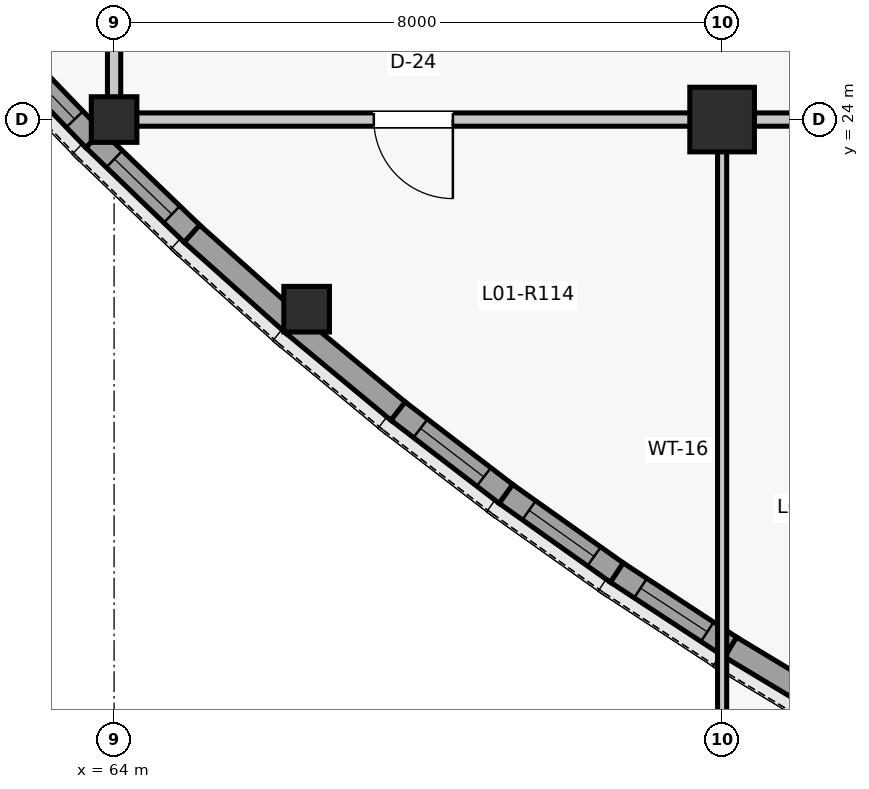
"""IFC4 building model, lengths in metres.
Left out: names, types, materials, properties, quantities, classifications, styles, units other than length and angle.
Written with IfcOpenShell. Run it as: python <this file> out.ifc"""

import sys

from ifc_helpers import new_model, si_unit, direction, frame, frame_2d, origin, origin_2d, place, context, subcontext, project, spatial, rectangle, extrude, element, fill, save


model = new_model("IFC4")
c1 = context("Model", 3, precision=1e-05, world=origin(), true_north=direction((0.0, 1.0)))
c2 = subcontext(c1, "Body", "Model", "MODEL_VIEW")
j1 = project(units=[si_unit("LENGTHUNIT", "METRE"), si_unit("PLANEANGLEUNIT", "RADIAN")], contexts=[c1])
p1 = place(None, origin())
s1 = spatial("IfcSite", under=j1, at=p1, CompositionType="ELEMENT")
p2 = place(p1, origin())
s2 = spatial("IfcBuilding", under=s1, at=p2, CompositionType="ELEMENT")
p3 = place(p2, frame((0.0, 0.0, 5.28)))
s3 = spatial("IfcBuildingStorey", under=s2, at=p3, CompositionType="ELEMENT", Elevation=5.28)
p4 = place(p3, frame((64.0, 24.0, 0.0), z_axis=(0.0, 0.0, 1.0), x_axis=(1.0, 0.0, 0.0)))
e1 = element("IfcColumn", 1, at=p4, inside=s3, PredefinedType="COLUMN", context=c2, shape_type="SweptSolid", body=[
    extrude(rectangle(XDim=0.6, YDim=0.6, at=origin_2d()), origin(), (0.0, 0.0, 1.0), 4.62),
])
p5 = place(p3, frame((72.0, 24.0, 0.0), z_axis=(0.0, 0.0, 1.0), x_axis=(1.0, 0.0, 0.0)))
e2 = element("IfcColumn", 2, at=p5, inside=s3, PredefinedType="COLUMN", context=c2, shape_type="SweptSolid", body=[
    extrude(rectangle(XDim=0.85, YDim=0.85, at=origin_2d()), origin(), (0.0, 0.0, 1.0), 4.62),
])
p6 = place(p3, frame((66.533, 21.505, 0.0), z_axis=(0.0, 0.0, 1.0), x_axis=(1.0, 0.0, 0.0)))
e3 = element("IfcColumn", 3, at=p6, inside=s3, PredefinedType="COLUMN", context=c2, shape_type="SweptSolid", body=[
    extrude(rectangle(XDim=0.6, YDim=0.6, at=origin_2d()), origin(), (0.0, 0.0, 1.0), 4.62),
])
p7 = place(p3, frame((62.494, 25.029, 0.0), z_axis=(0.0, 0.0, 1.0), x_axis=(0.693722700342, -0.720242191926, 0.0)))
e4 = element("IfcWall", 4, at=p7, inside=s3, PredefinedType="SOLIDWALL", context=c2, shape_type="SweptSolid", body=[
    extrude(rectangle(XDim=1.795, YDim=0.305, at=frame_2d((0.897, 0.0))), origin(), (0.0, 0.0, 1.0), 4.335),
])
p8 = place(p7, frame((0.373, 0.0, 0.9)))
e5 = element("IfcOpeningElement", 5, at=p8, cuts=e4, PredefinedType="OPENING", context=c2, shape_type="SweptSolid", body=[
    extrude(rectangle(XDim=1.05, YDim=1.85, at=frame_2d((0.525, 0.925))), frame((0.0, 0.162, 0.0), z_axis=(0.0, -1.0, 0.0), x_axis=(1.0, 0.0, 0.0)), (0.0, 0.0, 1.0), 0.325),
])
p9 = place(p3, frame((63.736, 23.74, 0.0), z_axis=(0.0, 0.0, 1.0), x_axis=(0.720242191926, -0.693722700342, 0.0)))
e6 = element("IfcWall", 6, at=p9, inside=s3, PredefinedType="SOLIDWALL", context=c2, shape_type="SweptSolid", body=[
    extrude(rectangle(XDim=1.795, YDim=0.305, at=frame_2d((0.897, 0.0))), origin(), (0.0, 0.0, 1.0), 4.335),
])
p10 = place(p9, frame((0.373, 0.0, 0.9)))
e7 = element("IfcOpeningElement", 7, at=p10, cuts=e6, PredefinedType="OPENING", context=c2, shape_type="SweptSolid", body=[
    extrude(rectangle(XDim=1.05, YDim=1.85, at=frame_2d((0.525, 0.925))), frame((0.0, 0.162, 0.0), z_axis=(0.0, -1.0, 0.0), x_axis=(1.0, 0.0, 0.0)), (0.0, 0.0, 1.0), 0.325),
])
p11 = place(p3, frame((65.024, 22.498, 0.0), z_axis=(0.0, 0.0, 1.0), x_axis=(0.745703543965, -0.666277888361, 0.0)))
e8 = element("IfcWall", 8, at=p11, inside=s3, PredefinedType="SOLIDWALL", context=c2, shape_type="SweptSolid", body=[
    extrude(rectangle(XDim=1.795, YDim=0.305, at=frame_2d((0.897, 0.0))), origin(), (0.0, 0.0, 1.0), 4.335),
])
p12 = place(p3, frame((66.358, 21.306, 0.0), z_axis=(0.0, 0.0, 1.0), x_axis=(0.769991012207, -0.638054732073, 0.0)))
e9 = element("IfcWall", 9, at=p12, inside=s3, PredefinedType="SOLIDWALL", context=c2, shape_type="SweptSolid", body=[
    extrude(rectangle(XDim=1.795, YDim=0.305, at=frame_2d((0.897, 0.0))), origin(), (0.0, 0.0, 1.0), 4.335),
])
p13 = place(p3, frame((67.736, 20.164, 0.0), z_axis=(0.0, 0.0, 1.0), x_axis=(0.793341406114, -0.608776981616, 0.0)))
e10 = element("IfcWall", 10, at=p13, inside=s3, PredefinedType="SOLIDWALL", context=c2, shape_type="SweptSolid", body=[
    extrude(rectangle(XDim=1.795, YDim=0.305, at=frame_2d((0.897, 0.0))), origin(), (0.0, 0.0, 1.0), 4.335),
])
p14 = place(p13, frame((0.373, 0.0, 0.9)))
e11 = element("IfcOpeningElement", 11, at=p14, cuts=e10, PredefinedType="OPENING", context=c2, shape_type="SweptSolid", body=[
    extrude(rectangle(XDim=1.05, YDim=1.85, at=frame_2d((0.525, 0.925))), frame((0.0, 0.162, 0.0), z_axis=(0.0, -1.0, 0.0), x_axis=(1.0, 0.0, 0.0)), (0.0, 0.0, 1.0), 0.325),
])
p15 = place(p3, frame((69.156, 19.075, 0.0), z_axis=(0.0, 0.0, 1.0), x_axis=(0.815567185578, -0.578662393636, 0.0)))
e12 = element("IfcWall", 12, at=p15, inside=s3, PredefinedType="SOLIDWALL", context=c2, shape_type="SweptSolid", body=[
    extrude(rectangle(XDim=1.795, YDim=0.305, at=frame_2d((0.897, 0.0))), origin(), (0.0, 0.0, 1.0), 4.335),
])
p16 = place(p15, frame((0.373, 0.0, 0.9)))
e13 = element("IfcOpeningElement", 13, at=p16, cuts=e12, PredefinedType="OPENING", context=c2, shape_type="SweptSolid", body=[
    extrude(rectangle(XDim=1.05, YDim=1.85, at=frame_2d((0.525, 0.925))), frame((0.0, 0.162, 0.0), z_axis=(0.0, -1.0, 0.0), x_axis=(1.0, 0.0, 0.0)), (0.0, 0.0, 1.0), 0.325),
])
p17 = place(p3, frame((70.615, 18.039, 0.0), z_axis=(0.0, 0.0, 1.0), x_axis=(0.836686786408, -0.547681678944, 0.0)))
e14 = element("IfcWall", 14, at=p17, inside=s3, PredefinedType="SOLIDWALL", context=c2, shape_type="SweptSolid", body=[
    extrude(rectangle(XDim=1.795, YDim=0.305, at=frame_2d((0.897, 0.0))), origin(), (0.0, 0.0, 1.0), 4.335),
])
p18 = place(p17, frame((0.373, 0.0, 0.9)))
e15 = element("IfcOpeningElement", 15, at=p18, cuts=e14, PredefinedType="OPENING", context=c2, shape_type="SweptSolid", body=[
    extrude(rectangle(XDim=1.05, YDim=1.85, at=frame_2d((0.525, 0.925))), frame((0.0, 0.162, 0.0), z_axis=(0.0, -1.0, 0.0), x_axis=(1.0, 0.0, 0.0)), (0.0, 0.0, 1.0), 0.325),
])
p19 = place(p3, frame((72.112, 17.059, 0.0), z_axis=(0.0, 0.0, 1.0), x_axis=(0.856543302071, -0.51607516088, 0.0)))
e16 = element("IfcWall", 16, at=p19, inside=s3, PredefinedType="SOLIDWALL", context=c2, shape_type="SweptSolid", body=[
    extrude(rectangle(XDim=1.795, YDim=0.305, at=frame_2d((0.897, 0.0))), origin(), (0.0, 0.0, 1.0), 4.335),
])
p20 = place(p3, frame((64.0, 24.29, 0.0), z_axis=(0.0, 0.0, 1.0), x_axis=(0.0, 1.0, 0.0)))
e17 = element("IfcWall", 17, at=p20, inside=s3, PredefinedType="PARTITIONING", context=c2, shape_type="SweptSolid", body=[
    extrude(rectangle(XDim=7.42, YDim=0.175, at=frame_2d((3.71, 0.0))), origin(), (0.0, 0.0, 1.0), 3.851),
])
p21 = place(p20, frame((2.76, 0.0, 0.0)))
e18 = element("IfcOpeningElement", 18, at=p21, cuts=e17, PredefinedType="OPENING", context=c2, shape_type="SweptSolid", body=[
    extrude(rectangle(XDim=1.9, YDim=2.38, at=frame_2d((0.95, 1.19))), frame((0.0, 0.097, 0.0), z_axis=(0.0, -1.0, 0.0), x_axis=(1.0, 0.0, 0.0)), (0.0, 0.0, 1.0), 0.195),
])
p22 = place(p3, frame((72.0, 16.0, 0.0), z_axis=(0.0, 0.0, 1.0), x_axis=(0.0, 1.0, 0.0)))
e19 = element("IfcWall", 19, at=p22, inside=s3, PredefinedType="PARTITIONING", context=c2, shape_type="SweptSolid", body=[
    extrude(rectangle(XDim=7.585, YDim=0.12, at=frame_2d((3.792, 0.0))), origin(), (0.0, 0.0, 1.0), 4.325),
])
p23 = place(p3, frame((64.29, 24.0, 0.0), z_axis=(0.0, 0.0, 1.0), x_axis=(1.0, 0.0, 0.0)))
e20 = element("IfcWall", 20, at=p23, inside=s3, PredefinedType="PARTITIONING", context=c2, shape_type="SweptSolid", body=[
    extrude(rectangle(XDim=7.295, YDim=0.175, at=frame_2d((3.647, 0.0))), origin(), (0.0, 0.0, 1.0), 3.781),
])
p24 = place(p23, frame((3.127, 0.0, 0.0)))
e21 = element("IfcOpeningElement", 21, at=p24, cuts=e20, PredefinedType="OPENING", context=c2, shape_type="SweptSolid", body=[
    extrude(rectangle(XDim=1.04, YDim=2.18, at=frame_2d((0.52, 1.09))), frame((0.0, 0.097, 0.0), z_axis=(0.0, -1.0, 0.0), x_axis=(1.0, 0.0, 0.0)), (0.0, 0.0, 1.0), 0.195),
])
p25 = place(p3, frame((72.415, 24.0, 0.0), z_axis=(0.0, 0.0, 1.0), x_axis=(1.0, 0.0, 0.0)))
e22 = element("IfcWall", 22, at=p25, inside=s3, PredefinedType="PARTITIONING", context=c2, shape_type="SweptSolid", body=[
    extrude(rectangle(XDim=7.17, YDim=0.175, at=frame_2d((3.585, 0.0))), origin(), (0.0, 0.0, 1.0), 3.712),
])
p26 = place(p25, frame((0.5, 0.0, 0.0)))
e23 = element("IfcOpeningElement", 23, at=p26, cuts=e22, PredefinedType="OPENING", context=c2, shape_type="SweptSolid", body=[
    extrude(rectangle(XDim=1.25, YDim=2.18, at=frame_2d((0.625, 1.09))), frame((0.0, 0.097, 0.0), z_axis=(0.0, -1.0, 0.0), x_axis=(1.0, 0.0, 0.0)), (0.0, 0.0, 1.0), 0.195),
])
p27 = place(p8, origin())
e24 = element("IfcWindow", 24, at=p27, inside=s3, PartitioningType="SINGLE_PANEL", PredefinedType="WINDOW", context=c2, shape_type="SweptSolid", body=[
    extrude(rectangle(XDim=1.05, YDim=1.85, at=frame_2d((0.525, 0.925))), frame((0.0, 0.03, 0.0), z_axis=(0.0, -1.0, 0.0), x_axis=(1.0, 0.0, 0.0)), (0.0, 0.0, 1.0), 0.06),
])
fill(e5, e24)
p28 = place(p10, origin())
e25 = element("IfcWindow", 25, at=p28, inside=s3, PartitioningType="SINGLE_PANEL", PredefinedType="WINDOW", context=c2, shape_type="SweptSolid", body=[
    extrude(rectangle(XDim=1.05, YDim=1.85, at=frame_2d((0.525, 0.925))), frame((0.0, 0.03, 0.0), z_axis=(0.0, -1.0, 0.0), x_axis=(1.0, 0.0, 0.0)), (0.0, 0.0, 1.0), 0.06),
])
fill(e7, e25)
p29 = place(p14, origin())
e26 = element("IfcWindow", 26, at=p29, inside=s3, PartitioningType="SINGLE_PANEL", PredefinedType="WINDOW", context=c2, shape_type="SweptSolid", body=[
    extrude(rectangle(XDim=1.05, YDim=1.85, at=frame_2d((0.525, 0.925))), frame((0.0, 0.03, 0.0), z_axis=(0.0, -1.0, 0.0), x_axis=(1.0, 0.0, 0.0)), (0.0, 0.0, 1.0), 0.06),
])
fill(e11, e26)
p30 = place(p16, origin())
e27 = element("IfcWindow", 27, at=p30, inside=s3, PartitioningType="SINGLE_PANEL", PredefinedType="WINDOW", context=c2, shape_type="SweptSolid", body=[
    extrude(rectangle(XDim=1.05, YDim=1.85, at=frame_2d((0.525, 0.925))), frame((0.0, 0.03, 0.0), z_axis=(0.0, -1.0, 0.0), x_axis=(1.0, 0.0, 0.0)), (0.0, 0.0, 1.0), 0.06),
])
fill(e13, e27)
p31 = place(p18, origin())
e28 = element("IfcWindow", 28, at=p31, inside=s3, PartitioningType="SINGLE_PANEL", PredefinedType="WINDOW", context=c2, shape_type="SweptSolid", body=[
    extrude(rectangle(XDim=1.05, YDim=1.85, at=frame_2d((0.525, 0.925))), frame((0.0, 0.03, 0.0), z_axis=(0.0, -1.0, 0.0), x_axis=(1.0, 0.0, 0.0)), (0.0, 0.0, 1.0), 0.06),
])
fill(e15, e28)
p32 = place(p24, frame((1.04, 0.0, 0.0), z_axis=(0.0, 0.0, 1.0), x_axis=(-1.0, 0.0, 0.0)))
e29 = element("IfcDoor", 29, at=p32, inside=s3, OperationType="SINGLE_SWING_RIGHT", PredefinedType="DOOR", context=c2, shape_type="SweptSolid", body=[
    extrude(rectangle(XDim=1.04, YDim=2.18, at=frame_2d((0.52, 1.09))), frame((0.0, 0.025, 0.0), z_axis=(0.0, -1.0, 0.0), x_axis=(1.0, 0.0, 0.0)), (0.0, 0.0, 1.0), 0.05),
])
fill(e21, e29)
save(model, sys.argv[1])
